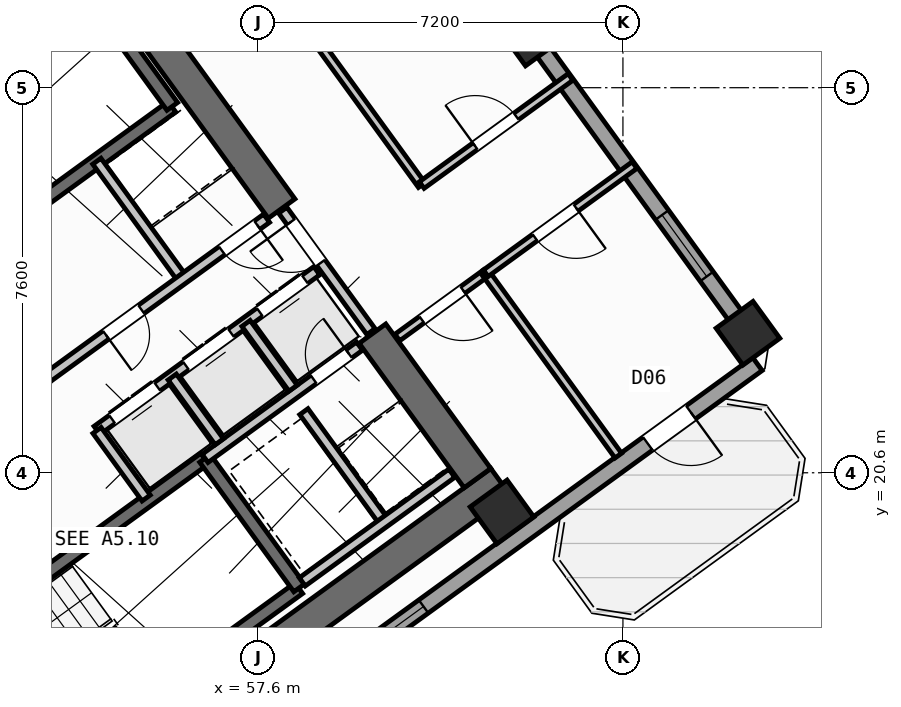
"""IFC4 building model, lengths in metres.
Left out: names, types, materials, properties, quantities, classifications, styles, units other than length and angle.
Written with IfcOpenShell. Run it as: python <this file> out.ifc"""

import sys

from ifc_helpers import new_model, si_unit, direction, frame, frame_2d, origin, origin_2d, place, context, subcontext, project, spatial, rectangle, hollow_rectangle, extrude, source, transform, mapped, element, fill, save


model = new_model("IFC4")
c1 = context("Model", 3, precision=1e-05, world=origin(), true_north=direction((0.0, 1.0)))
c2 = subcontext(c1, "Body", "Model", "MODEL_VIEW")
j1 = project(units=[si_unit("LENGTHUNIT", "METRE"), si_unit("PLANEANGLEUNIT", "RADIAN")], contexts=[c1])
p1 = place(None, origin())
s1 = spatial("IfcSite", under=j1, at=p1, CompositionType="ELEMENT")
p2 = place(p1, origin())
s2 = spatial("IfcBuilding", under=s1, at=p2, CompositionType="ELEMENT")
p3 = place(p2, frame((0.0, 0.0, 93.6)))
s3 = spatial("IfcBuildingStorey", under=s2, at=p3, CompositionType="ELEMENT", Elevation=93.6)
p4 = place(p3, frame((52.318, 13.11, 0.0), z_axis=(0.0, 0.0, 1.0), x_axis=(0.809019445368, 0.587781878776, 0.0)))
e1 = element("IfcWall", 1, at=p4, inside=s3, PredefinedType="SHEAR", context=c2, shape_type="SweptSolid", body=[
    extrude(rectangle(XDim=12.44, YDim=0.65, at=frame_2d((6.22, 0.0))), origin(), (0.0, 0.0, 1.0), 3.35),
])
p5 = place(p3, frame((44.325, 24.113, 0.0), z_axis=(0.0, 0.0, 1.0), x_axis=(0.809012664862, 0.58779121131, 0.0)))
e2 = element("IfcWall", 2, at=p5, inside=s3, PredefinedType="SHEAR", context=c2, shape_type="SweptSolid", body=[
    extrude(rectangle(XDim=12.44, YDim=0.65, at=frame_2d((6.22, 0.0))), origin(), (0.0, 0.0, 1.0), 3.35),
])
p6 = place(p3, frame((61.929, 20.494, 0.0), z_axis=(0.0, 0.0, 1.0), x_axis=(-0.58782982593, 0.808984607855, 0.0)))
e3 = element("IfcWall", 3, at=p6, inside=s3, PredefinedType="SHEAR", context=c2, shape_type="SweptSolid", body=[
    extrude(rectangle(XDim=3.525, YDim=0.65, at=frame_2d((1.762, 0.0))), origin(), (0.0, 0.0, 1.0), 3.35),
])
p7 = place(p3, frame((58.064, 25.813, 0.0), z_axis=(0.0, 0.0, 1.0), x_axis=(-0.58777996584, 0.809020835181, 0.0)))
e4 = element("IfcWall", 4, at=p7, inside=s3, PredefinedType="SHEAR", context=c2, shape_type="SweptSolid", body=[
    extrude(rectangle(XDim=6.375, YDim=0.65, at=frame_2d((3.188, 0.0))), origin(), (0.0, 0.0, 1.0), 3.35),
])
m1 = source(origin(), c2, "Body", "SweptSolid", [
    extrude(hollow_rectangle(XDim=0.9, YDim=0.9, WallThickness=0.036, at=origin_2d()), origin(), (0.0, 0.0, 1.0), 3.6),
])
for number, where, z_axis, x_axis in (
    (5, (62.414, 19.827, 0.0), (0.0, 0.0, 1.0), (0.809, 0.588, 0.0)),
    (6, (67.268, 23.354, 0.0), (0.0, 0.0, 1.0), (0.809, 0.588, 0.0)),
    (7, (62.977, 29.259, 0.0), (0.0, 0.0, 1.0), (0.809, 0.588, 0.0)),
):
    element("IfcColumn", number, at=place(p3, frame(where, z_axis=z_axis, x_axis=x_axis)), inside=s3, PredefinedType="COLUMN", context=c2, shape_type="MappedRepresentation", body=[
        mapped(m1, transform((0.0, 0.0, 0.0), scale=1.0)),
    ])
p8 = place(p3, frame((54.81, 40.5, 0.0), z_axis=(0.0, 0.0, 1.0), x_axis=(0.587783625747, -0.809018176127, 0.0)))
e8 = element("IfcWall", 8, at=p8, inside=s3, PredefinedType="STANDARD", context=c2, shape_type="SweptSolid", body=[
    extrude(rectangle(XDim=21.587, YDim=0.32, at=frame_2d((10.794, 0.0))), origin(), (0.0, 0.0, 1.0), 2.775),
])
p9 = place(p8, frame((2.143, 0.0, 0.8)))
e9 = element("IfcOpeningElement", 9, at=p9, cuts=e8, PredefinedType="OPENING", context=c2, shape_type="SweptSolid", body=[
    extrude(rectangle(XDim=2.1, YDim=1.55, at=frame_2d((1.05, 0.775))), frame((0.0, 0.17, 0.0), z_axis=(0.0, -1.0, 0.0), x_axis=(1.0, 0.0, 0.0)), (0.0, 0.0, 1.0), 0.34),
])
p10 = place(p8, frame((9.344, 0.0, 0.85)))
e10 = element("IfcOpeningElement", 10, at=p10, cuts=e8, PredefinedType="OPENING", context=c2, shape_type="SweptSolid", body=[
    extrude(rectangle(XDim=1.8, YDim=1.5, at=frame_2d((0.9, 0.75))), frame((0.0, 0.17, 0.0), z_axis=(0.0, -1.0, 0.0), x_axis=(1.0, 0.0, 0.0)), (0.0, 0.0, 1.0), 0.34),
])
p11 = place(p8, frame((18.309, 0.0, 0.85)))
e11 = element("IfcOpeningElement", 11, at=p11, cuts=e8, PredefinedType="OPENING", context=c2, shape_type="SweptSolid", body=[
    extrude(rectangle(XDim=1.5, YDim=1.5, at=frame_2d((0.75, 0.75))), frame((0.0, 0.17, 0.0), z_axis=(0.0, -1.0, 0.0), x_axis=(1.0, 0.0, 0.0)), (0.0, 0.0, 1.0), 0.34),
])
p12 = place(p3, frame((67.454, 22.747, 0.0), z_axis=(0.0, 0.0, 1.0), x_axis=(-0.809021120468, -0.587779573171, 0.0)))
e12 = element("IfcWall", 12, at=p12, inside=s3, PredefinedType="STANDARD", context=c2, shape_type="SweptSolid", body=[
    extrude(rectangle(XDim=17.588, YDim=0.32, at=frame_2d((8.794, 0.0))), origin(), (0.0, 0.0, 1.0), 3.35),
])
p13 = place(p12, frame((1.624, 0.0, 0.0)))
e13 = element("IfcOpeningElement", 13, at=p13, cuts=e12, PredefinedType="OPENING", context=c2, shape_type="SweptSolid", body=[
    extrude(rectangle(XDim=1.05, YDim=2.15, at=frame_2d((0.525, 1.075))), frame((0.0, 0.17, 0.0), z_axis=(0.0, -1.0, 0.0), x_axis=(1.0, 0.0, 0.0)), (0.0, 0.0, 1.0), 0.34),
])
p14 = place(p12, frame((8.144, 0.0, 0.8)))
e14 = element("IfcOpeningElement", 14, at=p14, cuts=e12, PredefinedType="OPENING", context=c2, shape_type="SweptSolid", body=[
    extrude(rectangle(XDim=2.1, YDim=1.55, at=frame_2d((1.05, 0.775))), frame((0.0, 0.17, 0.0), z_axis=(0.0, -1.0, 0.0), x_axis=(1.0, 0.0, 0.0)), (0.0, 0.0, 1.0), 0.34),
])
p15 = place(p12, frame((13.344, 0.0, 0.8)))
e15 = element("IfcOpeningElement", 15, at=p15, cuts=e12, PredefinedType="OPENING", context=c2, shape_type="SweptSolid", body=[
    extrude(rectangle(XDim=2.1, YDim=1.55, at=frame_2d((1.05, 0.775))), frame((0.0, 0.17, 0.0), z_axis=(0.0, -1.0, 0.0), x_axis=(1.0, 0.0, 0.0)), (0.0, 0.0, 1.0), 0.34),
])
p16 = place(p3, frame((48.006, 25.996, 0.0), z_axis=(0.0, 0.0, 1.0), x_axis=(0.80901903764, 0.587782439969, 0.0)))
e16 = element("IfcWall", 16, at=p16, inside=s3, PredefinedType="SHEAR", context=c2, shape_type="SweptSolid", body=[
    extrude(rectangle(XDim=7.46, YDim=0.26, at=frame_2d((3.73, 0.0))), origin(), (0.0, 0.0, 1.0), 3.35),
])
p17 = place(p3, frame((49.863, 23.44, 0.0), z_axis=(0.0, 0.0, 1.0), x_axis=(0.809003474932, 0.587803859759, 0.0)))
e17 = element("IfcWall", 17, at=p17, inside=s3, PredefinedType="SHEAR", context=c2, shape_type="SweptSolid", body=[
    extrude(rectangle(XDim=7.46, YDim=0.26, at=frame_2d((3.73, 0.0))), origin(), (0.0, 0.0, 1.0), 3.35),
])
p18 = place(p17, frame((0.36, 0.0, 0.0)))
e18 = element("IfcOpeningElement", 18, at=p18, cuts=e17, PredefinedType="OPENING", context=c2, shape_type="SweptSolid", body=[
    extrude(rectangle(XDim=0.86, YDim=2.05, at=frame_2d((0.43, 1.025))), frame((0.0, 0.14, 0.0), z_axis=(0.0, -1.0, 0.0), x_axis=(1.0, 0.0, 0.0)), (0.0, 0.0, 1.0), 0.28),
])
p19 = place(p3, frame((55.906, 27.831, 0.0), z_axis=(0.0, 0.0, 1.0), x_axis=(-0.587804123638, 0.809003283204, 0.0)))
e19 = element("IfcWall", 19, at=p19, inside=s3, PredefinedType="SHEAR", context=c2, shape_type="SweptSolid", body=[
    extrude(rectangle(XDim=3.16, YDim=0.26, at=frame_2d((1.58, 0.0))), origin(), (0.0, 0.0, 1.0), 3.35),
])
p20 = place(p3, frame((52.472, 14.013, 0.0), z_axis=(0.0, 0.0, 1.0), x_axis=(0.809028366311, 0.587769599847, 0.0)))
e20 = element("IfcWall", 20, at=p20, inside=s3, PredefinedType="SHEAR", context=c2, shape_type="SweptSolid", body=[
    extrude(rectangle(XDim=7.33, YDim=0.26, at=frame_2d((3.665, 0.0))), origin(), (0.0, 0.0, 1.0), 3.35),
])
p21 = place(p3, frame((50.615, 16.57, 0.0), z_axis=(0.0, 0.0, 1.0), x_axis=(0.809028366311, 0.587769599847, 0.0)))
e21 = element("IfcWall", 21, at=p21, inside=s3, PredefinedType="SHEAR", context=c2, shape_type="SweptSolid", body=[
    extrude(rectangle(XDim=7.33, YDim=0.26, at=frame_2d((3.665, 0.0))), origin(), (0.0, 0.0, 1.0), 3.35),
])
p22 = place(p21, frame((0.22, 0.0, 0.0)))
e22 = element("IfcOpeningElement", 22, at=p22, cuts=e21, PredefinedType="OPENING", context=c2, shape_type="SweptSolid", body=[
    extrude(rectangle(XDim=1.1, YDim=2.1, at=frame_2d((0.55, 1.05))), frame((0.0, 0.14, 0.0), z_axis=(0.0, -1.0, 0.0), x_axis=(1.0, 0.0, 0.0)), (0.0, 0.0, 1.0), 0.28),
])
p23 = place(p3, frame((58.41, 18.327, 0.0), z_axis=(0.0, 0.0, 1.0), x_axis=(-0.58776738483, 0.809029975545, 0.0)))
e23 = element("IfcWall", 23, at=p23, inside=s3, PredefinedType="SHEAR", context=c2, shape_type="SweptSolid", body=[
    extrude(rectangle(XDim=3.16, YDim=0.26, at=frame_2d((1.58, 0.0))), origin(), (0.0, 0.0, 1.0), 3.35),
])
p24 = place(p3, frame((56.553, 20.884, 0.0), z_axis=(0.0, 0.0, 1.0), x_axis=(0.809035789462, 0.587759382205, 0.0)))
e24 = element("IfcWall", 24, at=p24, inside=s3, PredefinedType="STANDARD", context=c2, shape_type="SweptSolid", body=[
    extrude(rectangle(XDim=3.768, YDim=0.2, at=frame_2d((1.884, 0.0))), origin(), (0.0, 0.0, 1.0), 3.34),
])
p25 = place(p24, frame((2.65, 0.0, 0.0)))
e25 = element("IfcOpeningElement", 25, at=p25, cuts=e24, PredefinedType="OPENING", context=c2, shape_type="SweptSolid", body=[
    extrude(rectangle(XDim=0.86, YDim=2.05, at=frame_2d((0.43, 1.025))), frame((0.0, 0.11, 0.0), z_axis=(0.0, -1.0, 0.0), x_axis=(1.0, 0.0, 0.0)), (0.0, 0.0, 1.0), 0.22),
])
p26 = place(p3, frame((54.421, 21.436, 0.0), z_axis=(0.0, 0.0, 1.0), x_axis=(0.809013710463, 0.587789772183, 0.0)))
e26 = element("IfcWall", 26, at=p26, inside=s3, PredefinedType="STANDARD", context=c2, shape_type="SweptSolid", body=[
    extrude(rectangle(XDim=5.36, YDim=0.2, at=frame_2d((2.68, 0.0))), origin(), (0.0, 0.0, 1.0), 3.34),
])
p27 = place(p26, frame((0.37, 0.0, 0.0)))
e27 = element("IfcOpeningElement", 27, at=p27, cuts=e26, PredefinedType="OPENING", context=c2, shape_type="SweptSolid", body=[
    extrude(rectangle(XDim=1.1, YDim=2.15, at=frame_2d((0.55, 1.075))), frame((0.0, 0.11, 0.0), z_axis=(0.0, -1.0, 0.0), x_axis=(1.0, 0.0, 0.0)), (0.0, 0.0, 1.0), 0.22),
])
p28 = place(p26, frame((2.17, 0.0, 0.0)))
e28 = element("IfcOpeningElement", 28, at=p28, cuts=e26, PredefinedType="OPENING", context=c2, shape_type="SweptSolid", body=[
    extrude(rectangle(XDim=1.1, YDim=2.15, at=frame_2d((0.55, 1.075))), frame((0.0, 0.11, 0.0), z_axis=(0.0, -1.0, 0.0), x_axis=(1.0, 0.0, 0.0)), (0.0, 0.0, 1.0), 0.22),
])
p29 = place(p26, frame((3.97, 0.0, 0.0)))
e29 = element("IfcOpeningElement", 29, at=p29, cuts=e26, PredefinedType="OPENING", context=c2, shape_type="SweptSolid", body=[
    extrude(rectangle(XDim=1.1, YDim=2.15, at=frame_2d((0.55, 1.075))), frame((0.0, 0.11, 0.0), z_axis=(0.0, -1.0, 0.0), x_axis=(1.0, 0.0, 0.0)), (0.0, 0.0, 1.0), 0.22),
])
p30 = place(p3, frame((55.391, 20.102, 0.0), z_axis=(0.0, 0.0, 1.0), x_axis=(-0.58778447739, 0.809017557374, 0.0)))
e30 = element("IfcWall", 30, at=p30, inside=s3, PredefinedType="STANDARD", context=c2, shape_type="SweptSolid", body=[
    extrude(rectangle(XDim=1.65, YDim=0.2, at=frame_2d((0.825, 0.0))), origin(), (0.0, 0.0, 1.0), 3.34),
])
p31 = place(p3, frame((56.834, 21.212, 0.0), z_axis=(0.0, 0.0, 1.0), x_axis=(-0.58776738483, 0.809029975545, 0.0)))
e31 = element("IfcWall", 31, at=p31, inside=s3, PredefinedType="STANDARD", context=c2, shape_type="SweptSolid", body=[
    extrude(rectangle(XDim=1.58, YDim=0.2, at=frame_2d((0.79, 0.0))), origin(), (0.0, 0.0, 1.0), 3.34),
])
p32 = place(p3, frame((58.29, 22.27, 0.0), z_axis=(0.0, 0.0, 1.0), x_axis=(-0.587840865826, 0.808976585857, 0.0)))
e32 = element("IfcWall", 32, at=p32, inside=s3, PredefinedType="STANDARD", context=c2, shape_type="SweptSolid", body=[
    extrude(rectangle(XDim=1.58, YDim=0.2, at=frame_2d((0.79, 0.0))), origin(), (0.0, 0.0, 1.0), 3.34),
])
p33 = place(p3, frame((60.067, 19.655, 0.0), z_axis=(0.0, 0.0, 1.0), x_axis=(-0.587800520745, 0.809005900975, 0.0)))
e33 = element("IfcWall", 33, at=p33, inside=s3, PredefinedType="STANDARD", context=c2, shape_type="SweptSolid", body=[
    extrude(rectangle(XDim=2.66, YDim=0.2, at=frame_2d((1.33, 0.0))), origin(), (0.0, 0.0, 1.0), 3.34),
])
p34 = place(p3, frame((58.472, 18.447, 0.0), z_axis=(0.0, 0.0, 1.0), x_axis=(0.809022487728, 0.587777691266, 0.0)))
e34 = element("IfcWall", 34, at=p34, inside=s3, PredefinedType="STANDARD", context=c2, shape_type="SweptSolid", body=[
    extrude(rectangle(XDim=3.648, YDim=0.2, at=frame_2d((1.824, 0.0))), origin(), (0.0, 0.0, 1.0), 3.34),
])
p35 = place(p3, frame((56.111, 24.419, 0.0), z_axis=(0.0, 0.0, 1.0), x_axis=(-0.58777848983, 0.809021907548, 0.0)))
e35 = element("IfcWall", 35, at=p35, inside=s3, PredefinedType="STANDARD", context=c2, shape_type="SweptSolid", body=[
    extrude(rectangle(XDim=2.88, YDim=0.2, at=frame_2d((1.44, 0.0))), origin(), (0.0, 0.0, 1.0), 3.34),
])
p36 = place(p3, frame((53.425, 22.468, 0.0), z_axis=(0.0, 0.0, 1.0), x_axis=(0.80902705128, 0.587771409902, 0.0)))
e36 = element("IfcWall", 36, at=p36, inside=s3, PredefinedType="STANDARD", context=c2, shape_type="SweptSolid", body=[
    extrude(rectangle(XDim=5.368, YDim=0.2, at=frame_2d((2.684, 0.0))), origin(), (0.0, 0.0, 1.0), 3.34),
])
p37 = place(p36, frame((4.28, 0.0, 0.0)))
e37 = element("IfcOpeningElement", 37, at=p37, cuts=e36, PredefinedType="OPENING", context=c2, shape_type="SweptSolid", body=[
    extrude(rectangle(XDim=0.86, YDim=2.05, at=frame_2d((0.43, 1.025))), frame((0.0, 0.11, 0.0), z_axis=(0.0, -1.0, 0.0), x_axis=(1.0, 0.0, 0.0)), (0.0, 0.0, 1.0), 0.22),
])
p38 = place(p36, frame((1.45, 0.0, 0.0)))
e38 = element("IfcOpeningElement", 38, at=p38, cuts=e36, PredefinedType="OPENING", context=c2, shape_type="SweptSolid", body=[
    extrude(rectangle(XDim=0.86, YDim=2.05, at=frame_2d((0.43, 1.025))), frame((0.0, 0.11, 0.0), z_axis=(0.0, -1.0, 0.0), x_axis=(1.0, 0.0, 0.0)), (0.0, 0.0, 1.0), 0.22),
])
p39 = place(p3, frame((59.827, 23.386, 0.0), z_axis=(0.0, 0.0, 1.0), x_axis=(-0.587803840107, 0.809003489211, 0.0)))
e39 = element("IfcWall", 39, at=p39, inside=s3, PredefinedType="STANDARD", context=c2, shape_type="SweptSolid", body=[
    extrude(rectangle(XDim=2.96, YDim=0.2, at=frame_2d((1.48, 0.0))), origin(), (0.0, 0.0, 1.0), 3.34),
])
p40 = place(p39, frame((1.68, 0.0, 0.0)))
e40 = element("IfcOpeningElement", 40, at=p40, cuts=e39, PredefinedType="OPENING", context=c2, shape_type="SweptSolid", body=[
    extrude(rectangle(XDim=1.0, YDim=2.1, at=frame_2d((0.5, 1.05))), frame((0.0, 0.11, 0.0), z_axis=(0.0, -1.0, 0.0), x_axis=(1.0, 0.0, 0.0)), (0.0, 0.0, 1.0), 0.22),
])
p41 = place(p3, frame((60.347, 23.27, 0.0), z_axis=(0.0, 0.0, 1.0), x_axis=(0.80899039758, 0.587821857898, 0.0)))
e41 = element("IfcWall", 41, at=p41, inside=s3, PredefinedType="PARTITIONING", context=c2, shape_type="SweptSolid", body=[
    extrude(rectangle(XDim=2.158, YDim=0.16, at=frame_2d((1.079, 0.0))), origin(), (0.0, 0.0, 1.0), 3.34),
])
p42 = place(p41, frame((0.598, 0.0, 0.0)))
e42 = element("IfcOpeningElement", 42, at=p42, cuts=e41, PredefinedType="OPENING", context=c2, shape_type="SweptSolid", body=[
    extrude(rectangle(XDim=1.0, YDim=2.1, at=frame_2d((0.5, 1.05))), frame((0.0, 0.09, 0.0), z_axis=(0.0, -1.0, 0.0), x_axis=(1.0, 0.0, 0.0)), (0.0, 0.0, 1.0), 0.18),
])
p43 = place(p3, frame((64.709, 20.938, 0.0), z_axis=(0.0, 0.0, 1.0), x_axis=(-0.587773666605, 0.809025411743, 0.0)))
e43 = element("IfcWall", 43, at=p43, inside=s3, PredefinedType="PARTITIONING", context=c2, shape_type="SweptSolid", body=[
    extrude(rectangle(XDim=4.45, YDim=0.16, at=frame_2d((2.225, 0.0))), origin(), (0.0, 0.0, 1.0), 3.34),
])
p44 = place(p3, frame((60.829, 26.278, 0.0), z_axis=(0.0, 0.0, 1.0), x_axis=(-0.587777474174, 0.809022645451, 0.0)))
e44 = element("IfcWall", 44, at=p44, inside=s3, PredefinedType="PARTITIONING", context=c2, shape_type="SweptSolid", body=[
    extrude(rectangle(XDim=15.1, YDim=0.16, at=frame_2d((7.55, 0.0))), origin(), (0.0, 0.0, 1.0), 3.34),
])
p45 = place(p3, frame((62.093, 24.538, 0.0), z_axis=(0.0, 0.0, 1.0), x_axis=(0.809035546126, 0.58775971715, 0.0)))
e45 = element("IfcWall", 45, at=p45, inside=s3, PredefinedType="PARTITIONING", context=c2, shape_type="SweptSolid", body=[
    extrude(rectangle(XDim=3.63, YDim=0.16, at=frame_2d((1.815, 0.0))), origin(), (0.0, 0.0, 1.0), 3.34),
])
p46 = place(p45, frame((1.2, 0.0, 0.0)))
e46 = element("IfcOpeningElement", 46, at=p46, cuts=e45, PredefinedType="OPENING", context=c2, shape_type="SweptSolid", body=[
    extrude(rectangle(XDim=1.0, YDim=2.1, at=frame_2d((0.5, 1.05))), frame((0.0, 0.09, 0.0), z_axis=(0.0, -1.0, 0.0), x_axis=(1.0, 0.0, 0.0)), (0.0, 0.0, 1.0), 0.18),
])
p47 = place(p3, frame((60.829, 26.278, 0.0), z_axis=(0.0, 0.0, 1.0), x_axis=(0.809003564202, 0.587803736896, 0.0)))
e47 = element("IfcWall", 47, at=p47, inside=s3, PredefinedType="PARTITIONING", context=c2, shape_type="SweptSolid", body=[
    extrude(rectangle(XDim=3.63, YDim=0.16, at=frame_2d((1.815, 0.0))), origin(), (0.0, 0.0, 1.0), 3.34),
])
p48 = place(p47, frame((1.305, 0.0, 0.0)))
e48 = element("IfcOpeningElement", 48, at=p48, cuts=e47, PredefinedType="OPENING", context=c2, shape_type="SweptSolid", body=[
    extrude(rectangle(XDim=1.0, YDim=2.1, at=frame_2d((0.5, 1.05))), frame((0.0, 0.09, 0.0), z_axis=(0.0, -1.0, 0.0), x_axis=(1.0, 0.0, 0.0)), (0.0, 0.0, 1.0), 0.18),
])
p49 = place(p3, frame((42.866, 26.044, 0.0), z_axis=(0.0, 0.0, 1.0), x_axis=(0.809020254154, 0.587780765566, 0.0)))
e49 = element("IfcWall", 49, at=p49, inside=s3, PredefinedType="PARTITIONING", context=c2, shape_type="SweptSolid", body=[
    extrude(rectangle(XDim=14.67, YDim=0.16, at=frame_2d((7.335, 0.0))), origin(), (0.0, 0.0, 1.0), 3.34),
])
p50 = place(p49, frame((10.2, 0.0, 0.0)))
e50 = element("IfcOpeningElement", 50, at=p50, cuts=e49, PredefinedType="OPENING", context=c2, shape_type="SweptSolid", body=[
    extrude(rectangle(XDim=1.0, YDim=2.1, at=frame_2d((0.5, 1.05))), frame((0.0, 0.09, 0.0), z_axis=(0.0, -1.0, 0.0), x_axis=(1.0, 0.0, 0.0)), (0.0, 0.0, 1.0), 0.18),
])
m2 = source(origin(), c2, "Body", "SweptSolid", [
    extrude(rectangle(XDim=1.05, YDim=2.15, at=frame_2d((0.525, 1.075))), frame((0.0, 0.025, 0.0), z_axis=(0.0, -1.0, 0.0), x_axis=(1.0, 0.0, 0.0)), (0.0, 0.0, 1.0), 0.05),
])
p51 = place(p13, origin())
e51 = element("IfcDoor", 51, at=p51, inside=s3, OperationType="SINGLE_SWING_LEFT", PredefinedType="DOOR", context=c2, shape_type="MappedRepresentation", body=[
    mapped(m2, transform((0.0, 0.0, 0.0), scale=1.0)),
])
fill(e13, e51)
m3 = source(origin(), c2, "Body", "SweptSolid", [
    extrude(rectangle(XDim=1.5, YDim=1.5, at=frame_2d((0.75, 0.75))), frame((0.0, 0.03, 0.0), z_axis=(0.0, -1.0, 0.0), x_axis=(1.0, 0.0, 0.0)), (0.0, 0.0, 1.0), 0.06),
])
p52 = place(p11, origin())
e52 = element("IfcWindow", 52, at=p52, inside=s3, PartitioningType="SINGLE_PANEL", PredefinedType="WINDOW", context=c2, shape_type="MappedRepresentation", body=[
    mapped(m3, transform((0.0, 0.0, 0.0), scale=1.0)),
])
fill(e11, e52)
m4 = source(origin(), c2, "Body", "SweptSolid", [
    extrude(rectangle(XDim=2.1, YDim=1.55, at=frame_2d((1.05, 0.775))), frame((0.0, 0.03, 0.0), z_axis=(0.0, -1.0, 0.0), x_axis=(1.0, 0.0, 0.0)), (0.0, 0.0, 1.0), 0.06),
])
p53 = place(p14, origin())
e53 = element("IfcWindow", 53, at=p53, inside=s3, PartitioningType="SINGLE_PANEL", PredefinedType="WINDOW", context=c2, shape_type="MappedRepresentation", body=[
    mapped(m4, transform((0.0, 0.0, 0.0), scale=1.0)),
])
fill(e14, e53)
m5 = source(origin(), c2, "Body", "SweptSolid", [
    extrude(rectangle(XDim=1.1, YDim=2.15, at=frame_2d((0.55, 1.075))), frame((0.0, 0.025, 0.0), z_axis=(0.0, -1.0, 0.0), x_axis=(1.0, 0.0, 0.0)), (0.0, 0.0, 1.0), 0.05),
])
p54 = place(p27, origin())
e54 = element("IfcDoor", 54, at=p54, inside=s3, OperationType="DOUBLE_DOOR_SLIDING", PredefinedType="DOOR", context=c2, shape_type="MappedRepresentation", body=[
    mapped(m5, transform((0.0, 0.0, 0.0), scale=1.0)),
])
fill(e27, e54)
p55 = place(p28, origin())
e55 = element("IfcDoor", 55, at=p55, inside=s3, OperationType="DOUBLE_DOOR_SLIDING", PredefinedType="DOOR", context=c2, shape_type="MappedRepresentation", body=[
    mapped(m5, transform((0.0, 0.0, 0.0), scale=1.0)),
])
fill(e28, e55)
p56 = place(p29, origin())
e56 = element("IfcDoor", 56, at=p56, inside=s3, OperationType="DOUBLE_DOOR_SLIDING", PredefinedType="DOOR", context=c2, shape_type="MappedRepresentation", body=[
    mapped(m5, transform((0.0, 0.0, 0.0), scale=1.0)),
])
fill(e29, e56)
m6 = source(origin(), c2, "Body", "SweptSolid", [
    extrude(rectangle(XDim=0.86, YDim=2.05, at=frame_2d((0.43, 1.025))), frame((0.0, 0.025, 0.0), z_axis=(0.0, -1.0, 0.0), x_axis=(1.0, 0.0, 0.0)), (0.0, 0.0, 1.0), 0.05),
])
p57 = place(p25, origin())
e57 = element("IfcDoor", 57, at=p57, inside=s3, OperationType="SINGLE_SWING_RIGHT", PredefinedType="DOOR", context=c2, shape_type="MappedRepresentation", body=[
    mapped(m6, transform((0.0, 0.0, 0.0), scale=1.0)),
])
fill(e25, e57)
p58 = place(p37, frame((0.86, 0.0, 0.0), z_axis=(0.0, 0.0, 1.0), x_axis=(-1.0, 0.0, 0.0)))
e58 = element("IfcDoor", 58, at=p58, inside=s3, OperationType="SINGLE_SWING_LEFT", PredefinedType="DOOR", context=c2, shape_type="MappedRepresentation", body=[
    mapped(m6, transform((0.0, 0.0, 0.0), scale=1.0)),
])
fill(e37, e58)
p59 = place(p38, frame((0.86, 0.0, 0.0), z_axis=(0.0, 0.0, 1.0), x_axis=(-1.0, 0.0, 0.0)))
e59 = element("IfcDoor", 59, at=p59, inside=s3, OperationType="SINGLE_SWING_RIGHT", PredefinedType="DOOR", context=c2, shape_type="MappedRepresentation", body=[
    mapped(m6, transform((0.0, 0.0, 0.0), scale=1.0)),
])
fill(e38, e59)
m7 = source(origin(), c2, "Body", "SweptSolid", [
    extrude(rectangle(XDim=1.0, YDim=2.1, at=frame_2d((0.5, 1.05))), frame((0.0, 0.025, 0.0), z_axis=(0.0, -1.0, 0.0), x_axis=(1.0, 0.0, 0.0)), (0.0, 0.0, 1.0), 0.05),
])
p60 = place(p42, frame((1.0, 0.0, 0.0), z_axis=(0.0, 0.0, 1.0), x_axis=(-1.0, 0.0, 0.0)))
e60 = element("IfcDoor", 60, at=p60, inside=s3, OperationType="SINGLE_SWING_LEFT", PredefinedType="DOOR", context=c2, shape_type="MappedRepresentation", body=[
    mapped(m7, transform((0.0, 0.0, 0.0), scale=1.0)),
])
fill(e42, e60)
p61 = place(p40, origin())
e61 = element("IfcDoor", 61, at=p61, inside=s3, OperationType="SINGLE_SWING_RIGHT", PredefinedType="DOOR", context=c2, shape_type="MappedRepresentation", body=[
    mapped(m7, transform((0.0, 0.0, 0.0), scale=1.0)),
])
fill(e40, e61)
p62 = place(p48, origin())
e62 = element("IfcDoor", 62, at=p62, inside=s3, OperationType="SINGLE_SWING_LEFT", PredefinedType="DOOR", context=c2, shape_type="MappedRepresentation", body=[
    mapped(m7, transform((0.0, 0.0, 0.0), scale=1.0)),
])
fill(e48, e62)
p63 = place(p46, frame((1.0, 0.0, 0.0), z_axis=(0.0, 0.0, 1.0), x_axis=(-1.0, 0.0, 0.0)))
e63 = element("IfcDoor", 63, at=p63, inside=s3, OperationType="SINGLE_SWING_LEFT", PredefinedType="DOOR", context=c2, shape_type="MappedRepresentation", body=[
    mapped(m7, transform((0.0, 0.0, 0.0), scale=1.0)),
])
fill(e46, e63)
save(model, sys.argv[1])
